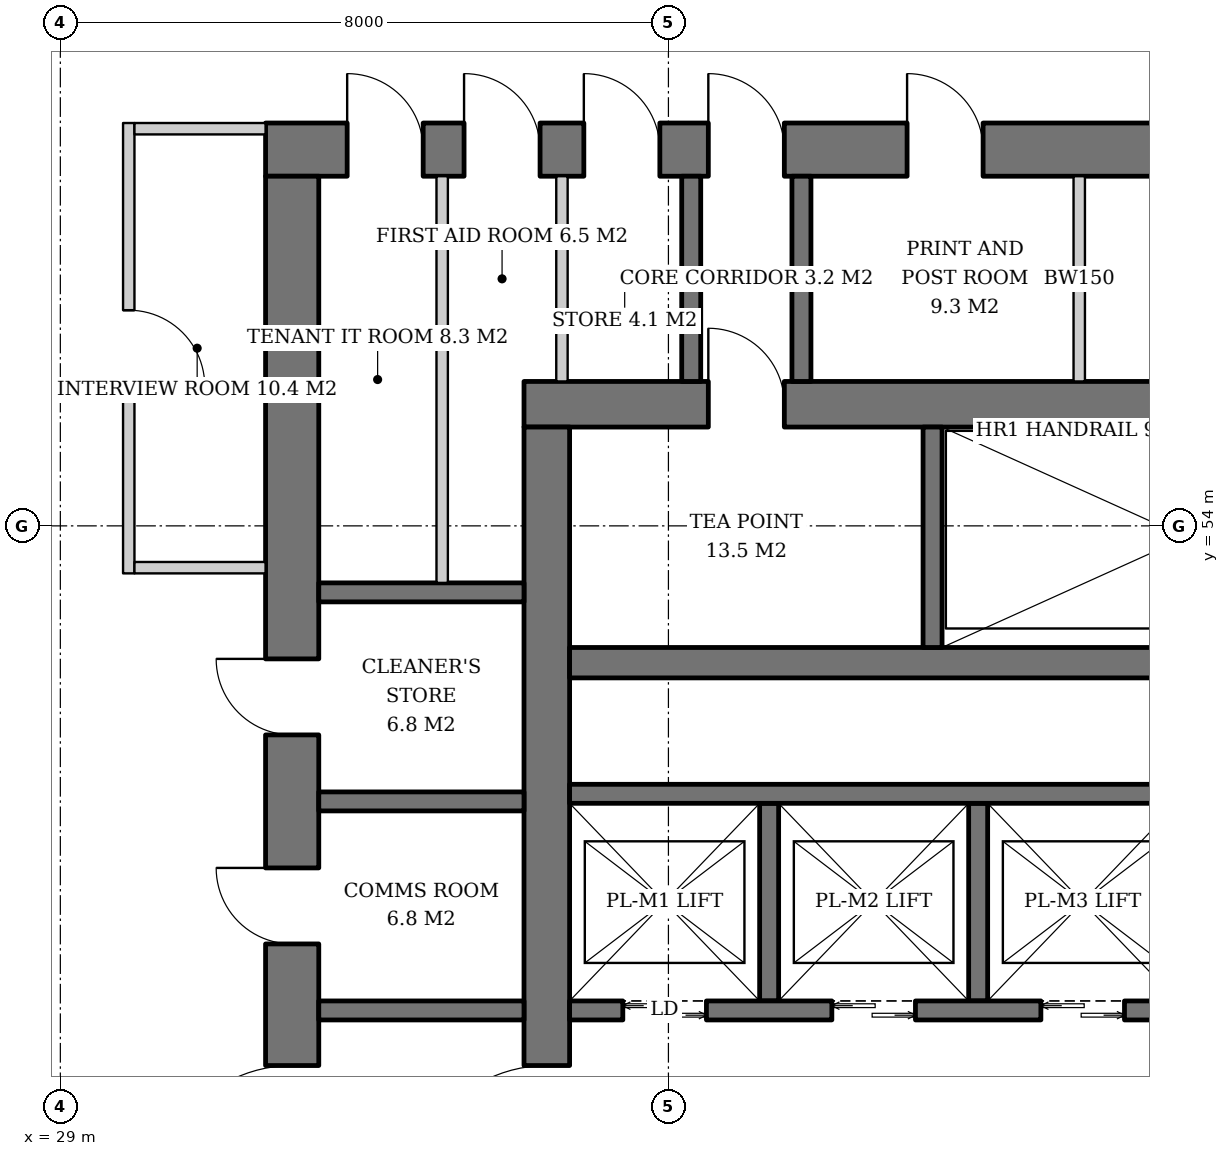
"""IFC4 building model, lengths in metres.
Left out: names, types, materials, properties, quantities, classifications, styles, units other than length and angle.
Written with IfcOpenShell. Run it as: python <this file> out.ifc"""

import sys

from ifc_helpers import new_model, si_unit, direction, frame, frame_2d, origin, place, context, subcontext, project, spatial, rectangle, extrude, element, fill, save


model = new_model("IFC4")
c1 = context("Model", 3, precision=1e-05, world=origin(), true_north=direction((0.0, 1.0)))
c2 = subcontext(c1, "Body", "Model", "MODEL_VIEW")
j1 = project(units=[si_unit("LENGTHUNIT", "METRE"), si_unit("PLANEANGLEUNIT", "RADIAN")], contexts=[c1])
p1 = place(None, origin())
s1 = spatial("IfcSite", under=j1, at=p1, CompositionType="ELEMENT")
p2 = place(p1, origin())
s2 = spatial("IfcBuilding", under=s1, at=p2, CompositionType="ELEMENT")
p3 = place(p2, frame((0.0, 0.0, 135.0)))
s3 = spatial("IfcBuildingStorey", under=s2, at=p3, CompositionType="ELEMENT", Elevation=135.0)
p4 = place(p3, frame((35.1, 55.6, 0.0), z_axis=(0.0, 0.0, 1.0), x_axis=(1.0, 0.0, 0.0)))
e1 = element("IfcWall", 1, at=p4, inside=s3, PredefinedType="SHEAR", context=c2, shape_type="SweptSolid", body=[
    extrude(rectangle(XDim=19.8, YDim=0.6, at=frame_2d((9.9, 0.0))), origin(), (0.0, 0.0, 1.0), 3.8),
])
p5 = place(p4, frame((14.54, 0.0, 0.0)))
e2 = element("IfcOpeningElement", 2, at=p5, cuts=e1, PredefinedType="OPENING", context=c2, shape_type="SweptSolid", body=[
    extrude(rectangle(XDim=1.0, YDim=2.1, at=frame_2d((0.5, 1.05))), frame((0.0, 0.31, 0.0), z_axis=(0.0, -1.0, 0.0), x_axis=(1.0, 0.0, 0.0)), (0.0, 0.0, 1.0), 0.62),
])
p6 = place(p4, frame((2.425, 0.0, 0.0)))
e3 = element("IfcOpeningElement", 3, at=p6, cuts=e1, PredefinedType="OPENING", context=c2, shape_type="SweptSolid", body=[
    extrude(rectangle(XDim=1.0, YDim=2.1, at=frame_2d((0.5, 1.05))), frame((0.0, 0.31, 0.0), z_axis=(0.0, -1.0, 0.0), x_axis=(1.0, 0.0, 0.0)), (0.0, 0.0, 1.0), 0.62),
])
p7 = place(p3, frame((35.4, 36.7, 0.0), z_axis=(0.0, 0.0, 1.0), x_axis=(0.0, 1.0, 0.0)))
e4 = element("IfcWall", 4, at=p7, inside=s3, PredefinedType="SHEAR", context=c2, shape_type="SweptSolid", body=[
    extrude(rectangle(XDim=18.6, YDim=0.6, at=frame_2d((9.3, 0.0))), origin(), (0.0, 0.0, 1.0), 3.8),
])
p8 = place(p7, frame((8.4, 0.0, 0.0)))
e5 = element("IfcOpeningElement", 5, at=p8, cuts=e4, PredefinedType="OPENING", context=c2, shape_type="SweptSolid", body=[
    extrude(rectangle(XDim=1.8, YDim=2.4, at=frame_2d((0.9, 1.2))), frame((0.0, 0.31, 0.0), z_axis=(0.0, -1.0, 0.0), x_axis=(1.0, 0.0, 0.0)), (0.0, 0.0, 1.0), 0.62),
])
p9 = place(p3, frame((31.7, 58.95, 0.0), z_axis=(0.0, 0.0, 1.0), x_axis=(1.0, 0.0, 0.0)))
e6 = element("IfcWall", 6, at=p9, inside=s3, PredefinedType="SHEAR", context=c2, shape_type="SweptSolid", body=[
    extrude(rectangle(XDim=26.6, YDim=0.7, at=frame_2d((13.3, 0.0))), origin(), (0.0, 0.0, 1.0), 3.8),
])
p10 = place(p9, frame((17.94, 0.0, 0.0)))
e7 = element("IfcOpeningElement", 7, at=p10, cuts=e6, PredefinedType="OPENING", context=c2, shape_type="SweptSolid", body=[
    extrude(rectangle(XDim=1.0, YDim=2.1, at=frame_2d((0.5, 1.05))), frame((0.0, 0.36, 0.0), z_axis=(0.0, -1.0, 0.0), x_axis=(1.0, 0.0, 0.0)), (0.0, 0.0, 1.0), 0.72),
])
p11 = place(p9, frame((5.825, 0.0, 0.0)))
e8 = element("IfcOpeningElement", 8, at=p11, cuts=e6, PredefinedType="OPENING", context=c2, shape_type="SweptSolid", body=[
    extrude(rectangle(XDim=1.0, YDim=2.1, at=frame_2d((0.5, 1.05))), frame((0.0, 0.36, 0.0), z_axis=(0.0, -1.0, 0.0), x_axis=(1.0, 0.0, 0.0)), (0.0, 0.0, 1.0), 0.72),
])
p12 = place(p9, frame((1.073, 0.0, 0.0)))
e9 = element("IfcOpeningElement", 9, at=p12, cuts=e6, PredefinedType="OPENING", context=c2, shape_type="SweptSolid", body=[
    extrude(rectangle(XDim=1.0, YDim=2.1, at=frame_2d((0.5, 1.05))), frame((0.0, 0.36, 0.0), z_axis=(0.0, -1.0, 0.0), x_axis=(1.0, 0.0, 0.0)), (0.0, 0.0, 1.0), 0.72),
])
p13 = place(p9, frame((2.611, 0.0, 0.0)))
e10 = element("IfcOpeningElement", 10, at=p13, cuts=e6, PredefinedType="OPENING", context=c2, shape_type="SweptSolid", body=[
    extrude(rectangle(XDim=1.0, YDim=2.1, at=frame_2d((0.5, 1.05))), frame((0.0, 0.36, 0.0), z_axis=(0.0, -1.0, 0.0), x_axis=(1.0, 0.0, 0.0)), (0.0, 0.0, 1.0), 0.72),
])
p14 = place(p9, frame((4.187, 0.0, 0.0)))
e11 = element("IfcOpeningElement", 11, at=p14, cuts=e6, PredefinedType="OPENING", context=c2, shape_type="SweptSolid", body=[
    extrude(rectangle(XDim=1.0, YDim=2.1, at=frame_2d((0.5, 1.05))), frame((0.0, 0.36, 0.0), z_axis=(0.0, -1.0, 0.0), x_axis=(1.0, 0.0, 0.0)), (0.0, 0.0, 1.0), 0.72),
])
p15 = place(p9, frame((8.44, 0.0, 0.0)))
e12 = element("IfcOpeningElement", 12, at=p15, cuts=e6, PredefinedType="OPENING", context=c2, shape_type="SweptSolid", body=[
    extrude(rectangle(XDim=1.0, YDim=2.1, at=frame_2d((0.5, 1.05))), frame((0.0, 0.36, 0.0), z_axis=(0.0, -1.0, 0.0), x_axis=(1.0, 0.0, 0.0)), (0.0, 0.0, 1.0), 0.72),
])
p16 = place(p9, frame((13.342, 0.0, 0.0)))
e13 = element("IfcOpeningElement", 13, at=p16, cuts=e6, PredefinedType="OPENING", context=c2, shape_type="SweptSolid", body=[
    extrude(rectangle(XDim=1.0, YDim=2.1, at=frame_2d((0.5, 1.05))), frame((0.0, 0.36, 0.0), z_axis=(0.0, -1.0, 0.0), x_axis=(1.0, 0.0, 0.0)), (0.0, 0.0, 1.0), 0.72),
])
p17 = place(p9, frame((22.4, 0.0, 0.0)))
e14 = element("IfcOpeningElement", 14, at=p17, cuts=e6, PredefinedType="OPENING", context=c2, shape_type="SweptSolid", body=[
    extrude(rectangle(XDim=1.0, YDim=2.1, at=frame_2d((0.5, 1.05))), frame((0.0, 0.36, 0.0), z_axis=(0.0, -1.0, 0.0), x_axis=(1.0, 0.0, 0.0)), (0.0, 0.0, 1.0), 0.72),
])
p18 = place(p3, frame((32.05, 33.4, 0.0), z_axis=(0.0, 0.0, 1.0), x_axis=(0.0, 1.0, 0.0)))
e15 = element("IfcWall", 15, at=p18, inside=s3, PredefinedType="SHEAR", context=c2, shape_type="SweptSolid", body=[
    extrude(rectangle(XDim=25.2, YDim=0.7, at=frame_2d((12.6, 0.0))), origin(), (0.0, 0.0, 1.0), 3.8),
])
p19 = place(p18, frame((11.7, 0.0, 0.0)))
e16 = element("IfcOpeningElement", 16, at=p19, cuts=e15, PredefinedType="OPENING", context=c2, shape_type="SweptSolid", body=[
    extrude(rectangle(XDim=1.8, YDim=2.4, at=frame_2d((0.9, 1.2))), frame((0.0, 0.36, 0.0), z_axis=(0.0, -1.0, 0.0), x_axis=(1.0, 0.0, 0.0)), (0.0, 0.0, 1.0), 0.72),
])
p20 = place(p18, frame((3.6, 0.0, 0.0)))
e17 = element("IfcOpeningElement", 17, at=p20, cuts=e15, PredefinedType="OPENING", context=c2, shape_type="SweptSolid", body=[
    extrude(rectangle(XDim=1.0, YDim=2.1, at=frame_2d((0.5, 1.05))), frame((0.0, 0.36, 0.0), z_axis=(0.0, -1.0, 0.0), x_axis=(1.0, 0.0, 0.0)), (0.0, 0.0, 1.0), 0.72),
])
p21 = place(p18, frame((6.35, 0.0, 0.0)))
e18 = element("IfcOpeningElement", 18, at=p21, cuts=e15, PredefinedType="OPENING", context=c2, shape_type="SweptSolid", body=[
    extrude(rectangle(XDim=1.0, YDim=2.1, at=frame_2d((0.5, 1.05))), frame((0.0, 0.36, 0.0), z_axis=(0.0, -1.0, 0.0), x_axis=(1.0, 0.0, 0.0)), (0.0, 0.0, 1.0), 0.72),
])
p22 = place(p18, frame((9.1, 0.0, 0.0)))
e19 = element("IfcOpeningElement", 19, at=p22, cuts=e15, PredefinedType="OPENING", context=c2, shape_type="SweptSolid", body=[
    extrude(rectangle(XDim=1.0, YDim=2.1, at=frame_2d((0.5, 1.05))), frame((0.0, 0.36, 0.0), z_axis=(0.0, -1.0, 0.0), x_axis=(1.0, 0.0, 0.0)), (0.0, 0.0, 1.0), 0.72),
])
p23 = place(p18, frame((15.1, 0.0, 0.0)))
e20 = element("IfcOpeningElement", 20, at=p23, cuts=e15, PredefinedType="OPENING", context=c2, shape_type="SweptSolid", body=[
    extrude(rectangle(XDim=1.0, YDim=2.1, at=frame_2d((0.5, 1.05))), frame((0.0, 0.36, 0.0), z_axis=(0.0, -1.0, 0.0), x_axis=(1.0, 0.0, 0.0)), (0.0, 0.0, 1.0), 0.72),
])
p24 = place(p18, frame((17.85, 0.0, 0.0)))
e21 = element("IfcOpeningElement", 21, at=p24, cuts=e15, PredefinedType="OPENING", context=c2, shape_type="SweptSolid", body=[
    extrude(rectangle(XDim=1.0, YDim=2.1, at=frame_2d((0.5, 1.05))), frame((0.0, 0.36, 0.0), z_axis=(0.0, -1.0, 0.0), x_axis=(1.0, 0.0, 0.0)), (0.0, 0.0, 1.0), 0.72),
])
p25 = place(p3, frame((35.7, 52.2, 0.0), z_axis=(0.0, 0.0, 1.0), x_axis=(1.0, 0.0, 0.0)))
e22 = element("IfcWall", 22, at=p25, inside=s3, PredefinedType="SHEAR", context=c2, shape_type="SweptSolid", body=[
    extrude(rectangle(XDim=18.6, YDim=0.4, at=frame_2d((9.3, 0.0))), origin(), (0.0, 0.0, 1.0), 3.8),
])
p26 = place(p3, frame((40.475, 52.4, 0.0), z_axis=(0.0, 0.0, 1.0), x_axis=(0.0, 1.0, 0.0)))
e23 = element("IfcWall", 23, at=p26, inside=s3, PredefinedType="SHEAR", context=c2, shape_type="SweptSolid", body=[
    extrude(rectangle(XDim=2.9, YDim=0.25, at=frame_2d((1.45, 0.0))), origin(), (0.0, 0.0, 1.0), 3.8),
])
for number, where, z_axis, x_axis in (
    (24, (38.325, 47.75, 0.0), (0.0, 0.0, 1.0), (0.0, 1.0, 0.0)),
    (25, (41.075, 47.75, 0.0), (0.0, 0.0, 1.0), (0.0, 1.0, 0.0)),
):
    element("IfcWall", number, at=place(p3, frame(where, z_axis=z_axis, x_axis=x_axis)), inside=s3, PredefinedType="SHEAR", context=c2, shape_type="SweptSolid", body=[
        extrude(rectangle(XDim=2.6, YDim=0.25, at=frame_2d((1.3, 0.0))), origin(), (0.0, 0.0, 1.0), 3.8),
    ])
p27 = place(p3, frame((35.7, 50.475, 0.0), z_axis=(0.0, 0.0, 1.0), x_axis=(1.0, 0.0, 0.0)))
e26 = element("IfcWall", 26, at=p27, inside=s3, PredefinedType="SHEAR", context=c2, shape_type="SweptSolid", body=[
    extrude(rectangle(XDim=11.0, YDim=0.25, at=frame_2d((5.5, 0.0))), origin(), (0.0, 0.0, 1.0), 3.8),
])
p28 = place(p3, frame((35.7, 47.625, 0.0), z_axis=(0.0, 0.0, 1.0), x_axis=(1.0, 0.0, 0.0)))
e27 = element("IfcWall", 27, at=p28, inside=s3, PredefinedType="SHEAR", context=c2, shape_type="SweptSolid", body=[
    extrude(rectangle(XDim=12.83, YDim=0.25, at=frame_2d((6.415, 0.0))), origin(), (0.0, 0.0, 1.0), 3.8),
])
p29 = place(p28, frame((0.7, 0.0, 0.0)))
e28 = element("IfcOpeningElement", 28, at=p29, cuts=e27, PredefinedType="OPENING", context=c2, shape_type="SweptSolid", body=[
    extrude(rectangle(XDim=1.1, YDim=2.2, at=frame_2d((0.55, 1.1))), frame((0.0, 0.135, 0.0), z_axis=(0.0, -1.0, 0.0), x_axis=(1.0, 0.0, 0.0)), (0.0, 0.0, 1.0), 0.27),
])
p30 = place(p28, frame((3.45, 0.0, 0.0)))
e29 = element("IfcOpeningElement", 29, at=p30, cuts=e27, PredefinedType="OPENING", context=c2, shape_type="SweptSolid", body=[
    extrude(rectangle(XDim=1.1, YDim=2.2, at=frame_2d((0.55, 1.1))), frame((0.0, 0.135, 0.0), z_axis=(0.0, -1.0, 0.0), x_axis=(1.0, 0.0, 0.0)), (0.0, 0.0, 1.0), 0.27),
])
p31 = place(p28, frame((6.2, 0.0, 0.0)))
e30 = element("IfcOpeningElement", 30, at=p31, cuts=e27, PredefinedType="OPENING", context=c2, shape_type="SweptSolid", body=[
    extrude(rectangle(XDim=1.1, YDim=2.2, at=frame_2d((0.55, 1.1))), frame((0.0, 0.135, 0.0), z_axis=(0.0, -1.0, 0.0), x_axis=(1.0, 0.0, 0.0)), (0.0, 0.0, 1.0), 0.27),
])
p32 = place(p28, frame((8.95, 0.0, 0.0)))
e31 = element("IfcOpeningElement", 31, at=p32, cuts=e27, PredefinedType="OPENING", context=c2, shape_type="SweptSolid", body=[
    extrude(rectangle(XDim=1.1, YDim=2.2, at=frame_2d((0.55, 1.1))), frame((0.0, 0.135, 0.0), z_axis=(0.0, -1.0, 0.0), x_axis=(1.0, 0.0, 0.0)), (0.0, 0.0, 1.0), 0.27),
])
p33 = place(p28, frame((11.515, 0.0, 0.0)))
e32 = element("IfcOpeningElement", 32, at=p33, cuts=e27, PredefinedType="OPENING", context=c2, shape_type="SweptSolid", body=[
    extrude(rectangle(XDim=0.8, YDim=2.0, at=frame_2d((0.4, 1.0))), frame((0.0, 0.135, 0.0), z_axis=(0.0, -1.0, 0.0), x_axis=(1.0, 0.0, 0.0)), (0.0, 0.0, 1.0), 0.27),
])
for number, where, z_axis, x_axis in (
    (33, (32.4, 47.625, 0.0), (0.0, 0.0, 1.0), (1.0, 0.0, 0.0)),
    (34, (32.4, 50.375, 0.0), (0.0, 0.0, 1.0), (1.0, 0.0, 0.0)),
    (35, (32.4, 53.125, 0.0), (0.0, 0.0, 1.0), (1.0, 0.0, 0.0)),
):
    element("IfcWall", number, at=place(p3, frame(where, z_axis=z_axis, x_axis=x_axis)), inside=s3, PredefinedType="SHEAR", context=c2, shape_type="SweptSolid", body=[
        extrude(rectangle(XDim=2.7, YDim=0.25, at=frame_2d((1.35, 0.0))), origin(), (0.0, 0.0, 1.0), 3.8),
    ])
for number, where, z_axis, x_axis in (
    (36, (37.3, 55.9, 0.0), (0.0, 0.0, 1.0), (0.0, 1.0, 0.0)),
    (37, (38.75, 55.9, 0.0), (0.0, 0.0, 1.0), (0.0, 1.0, 0.0)),
):
    element("IfcWall", number, at=place(p3, frame(where, z_axis=z_axis, x_axis=x_axis)), inside=s3, PredefinedType="SOLIDWALL", context=c2, shape_type="SweptSolid", body=[
        extrude(rectangle(XDim=2.7, YDim=0.25, at=frame_2d((1.35, 0.0))), origin(), (0.0, 0.0, 1.0), 3.62),
    ])
p34 = place(p3, frame((34.023, 53.25, 0.0), z_axis=(0.0, 0.0, 1.0), x_axis=(0.0, 1.0, 0.0)))
e38 = element("IfcWall", 38, at=p34, inside=s3, PredefinedType="SOLIDWALL", context=c2, shape_type="SweptSolid", body=[
    extrude(rectangle(XDim=5.35, YDim=0.15, at=frame_2d((2.675, 0.0))), origin(), (0.0, 0.0, 1.0), 3.62),
])
for number, where, z_axis, x_axis in (
    (39, (35.599, 55.9, 0.0), (0.0, 0.0, 1.0), (0.0, 1.0, 0.0)),
    (40, (42.405, 55.9, 0.0), (0.0, 0.0, 1.0), (0.0, 1.0, 0.0)),
):
    element("IfcWall", number, at=place(p3, frame(where, z_axis=z_axis, x_axis=x_axis)), inside=s3, PredefinedType="SOLIDWALL", context=c2, shape_type="SweptSolid", body=[
        extrude(rectangle(XDim=2.7, YDim=0.15, at=frame_2d((1.35, 0.0))), origin(), (0.0, 0.0, 1.0), 3.62),
    ])
p35 = place(p3, frame((29.9, 59.3, 0.0), z_axis=(0.0, 0.0, 1.0), x_axis=(0.0, -1.0, 0.0)))
e41 = element("IfcWall", 41, at=p35, inside=s3, PredefinedType="PARTITIONING", context=c2, shape_type="SweptSolid", body=[
    extrude(rectangle(XDim=5.925, YDim=0.15, at=frame_2d((2.962, 0.0))), origin(), (0.0, 0.0, 1.0), 2.72),
])
p36 = place(p35, frame((2.462, 0.0, 0.0)))
e42 = element("IfcOpeningElement", 42, at=p36, cuts=e41, PredefinedType="OPENING", context=c2, shape_type="SweptSolid", body=[
    extrude(rectangle(XDim=1.0, YDim=2.1, at=frame_2d((0.5, 1.05))), frame((0.0, 0.085, 0.0), z_axis=(0.0, -1.0, 0.0), x_axis=(1.0, 0.0, 0.0)), (0.0, 0.0, 1.0), 0.17),
])
for number, where, z_axis, x_axis in (
    (43, (31.7, 59.225, 0.0), (0.0, 0.0, 1.0), (-1.0, 0.0, 0.0)),
    (44, (31.7, 53.45, 0.0), (0.0, 0.0, 1.0), (-1.0, 0.0, 0.0)),
):
    element("IfcWall", number, at=place(p3, frame(where, z_axis=z_axis, x_axis=x_axis)), inside=s3, PredefinedType="PARTITIONING", context=c2, shape_type="SweptSolid", body=[
        extrude(rectangle(XDim=1.725, YDim=0.15, at=frame_2d((0.862, 0.0))), origin(), (0.0, 0.0, 1.0), 3.62),
    ])
p37 = place(p29, origin())
e45 = element("IfcDoor", 45, at=p37, inside=s3, OperationType="DOUBLE_DOOR_SLIDING", PredefinedType="DOOR", context=c2, shape_type="SweptSolid", body=[
    extrude(rectangle(XDim=1.1, YDim=2.2, at=frame_2d((0.55, 1.1))), frame((0.0, 0.025, 0.0), z_axis=(0.0, -1.0, 0.0), x_axis=(1.0, 0.0, 0.0)), (0.0, 0.0, 1.0), 0.05),
])
fill(e28, e45)
p38 = place(p30, origin())
e46 = element("IfcDoor", 46, at=p38, inside=s3, OperationType="DOUBLE_DOOR_SLIDING", PredefinedType="DOOR", context=c2, shape_type="SweptSolid", body=[
    extrude(rectangle(XDim=1.1, YDim=2.2, at=frame_2d((0.55, 1.1))), frame((0.0, 0.025, 0.0), z_axis=(0.0, -1.0, 0.0), x_axis=(1.0, 0.0, 0.0)), (0.0, 0.0, 1.0), 0.05),
])
fill(e29, e46)
p39 = place(p31, origin())
e47 = element("IfcDoor", 47, at=p39, inside=s3, OperationType="DOUBLE_DOOR_SLIDING", PredefinedType="DOOR", context=c2, shape_type="SweptSolid", body=[
    extrude(rectangle(XDim=1.1, YDim=2.2, at=frame_2d((0.55, 1.1))), frame((0.0, 0.025, 0.0), z_axis=(0.0, -1.0, 0.0), x_axis=(1.0, 0.0, 0.0)), (0.0, 0.0, 1.0), 0.05),
])
fill(e30, e47)
p40 = place(p8, origin())
e48 = element("IfcDoor", 48, at=p40, inside=s3, OperationType="DOUBLE_DOOR_SINGLE_SWING", PredefinedType="DOOR", context=c2, shape_type="SweptSolid", body=[
    extrude(rectangle(XDim=1.8, YDim=2.4, at=frame_2d((0.9, 1.2))), frame((0.0, 0.025, 0.0), z_axis=(0.0, -1.0, 0.0), x_axis=(1.0, 0.0, 0.0)), (0.0, 0.0, 1.0), 0.05),
])
fill(e5, e48)
p41 = place(p19, origin())
e49 = element("IfcDoor", 49, at=p41, inside=s3, OperationType="DOUBLE_DOOR_SINGLE_SWING", PredefinedType="DOOR", context=c2, shape_type="SweptSolid", body=[
    extrude(rectangle(XDim=1.8, YDim=2.4, at=frame_2d((0.9, 1.2))), frame((0.0, 0.025, 0.0), z_axis=(0.0, -1.0, 0.0), x_axis=(1.0, 0.0, 0.0)), (0.0, 0.0, 1.0), 0.05),
])
fill(e16, e49)
p42 = place(p11, origin())
e50 = element("IfcDoor", 50, at=p42, inside=s3, OperationType="SINGLE_SWING_LEFT", PredefinedType="DOOR", context=c2, shape_type="SweptSolid", body=[
    extrude(rectangle(XDim=1.0, YDim=2.1, at=frame_2d((0.5, 1.05))), frame((0.0, 0.025, 0.0), z_axis=(0.0, -1.0, 0.0), x_axis=(1.0, 0.0, 0.0)), (0.0, 0.0, 1.0), 0.05),
])
fill(e8, e50)
p43 = place(p6, origin())
e51 = element("IfcDoor", 51, at=p43, inside=s3, OperationType="SINGLE_SWING_LEFT", PredefinedType="DOOR", context=c2, shape_type="SweptSolid", body=[
    extrude(rectangle(XDim=1.0, YDim=2.1, at=frame_2d((0.5, 1.05))), frame((0.0, -0.24, 0.0), z_axis=(0.0, -1.0, 0.0), x_axis=(1.0, 0.0, 0.0)), (0.0, 0.0, 1.0), 0.05),
])
fill(e3, e51)
p44 = place(p23, origin())
e52 = element("IfcDoor", 52, at=p44, inside=s3, OperationType="SINGLE_SWING_RIGHT", PredefinedType="DOOR", context=c2, shape_type="SweptSolid", body=[
    extrude(rectangle(XDim=1.0, YDim=2.1, at=frame_2d((0.5, 1.05))), frame((0.0, -0.29, 0.0), z_axis=(0.0, -1.0, 0.0), x_axis=(1.0, 0.0, 0.0)), (0.0, 0.0, 1.0), 0.05),
])
fill(e20, e52)
p45 = place(p24, origin())
e53 = element("IfcDoor", 53, at=p45, inside=s3, OperationType="SINGLE_SWING_RIGHT", PredefinedType="DOOR", context=c2, shape_type="SweptSolid", body=[
    extrude(rectangle(XDim=1.0, YDim=2.1, at=frame_2d((0.5, 1.05))), frame((0.0, -0.29, 0.0), z_axis=(0.0, -1.0, 0.0), x_axis=(1.0, 0.0, 0.0)), (0.0, 0.0, 1.0), 0.05),
])
fill(e21, e53)
p46 = place(p12, origin())
e54 = element("IfcDoor", 54, at=p46, inside=s3, OperationType="SINGLE_SWING_LEFT", PredefinedType="DOOR", context=c2, shape_type="SweptSolid", body=[
    extrude(rectangle(XDim=1.0, YDim=2.1, at=frame_2d((0.5, 1.05))), frame((0.0, -0.29, 0.0), z_axis=(0.0, -1.0, 0.0), x_axis=(1.0, 0.0, 0.0)), (0.0, 0.0, 1.0), 0.05),
])
fill(e9, e54)
p47 = place(p13, origin())
e55 = element("IfcDoor", 55, at=p47, inside=s3, OperationType="SINGLE_SWING_LEFT", PredefinedType="DOOR", context=c2, shape_type="SweptSolid", body=[
    extrude(rectangle(XDim=1.0, YDim=2.1, at=frame_2d((0.5, 1.05))), frame((0.0, -0.29, 0.0), z_axis=(0.0, -1.0, 0.0), x_axis=(1.0, 0.0, 0.0)), (0.0, 0.0, 1.0), 0.05),
])
fill(e10, e55)
p48 = place(p14, origin())
e56 = element("IfcDoor", 56, at=p48, inside=s3, OperationType="SINGLE_SWING_LEFT", PredefinedType="DOOR", context=c2, shape_type="SweptSolid", body=[
    extrude(rectangle(XDim=1.0, YDim=2.1, at=frame_2d((0.5, 1.05))), frame((0.0, -0.29, 0.0), z_axis=(0.0, -1.0, 0.0), x_axis=(1.0, 0.0, 0.0)), (0.0, 0.0, 1.0), 0.05),
])
fill(e11, e56)
p49 = place(p15, origin())
e57 = element("IfcDoor", 57, at=p49, inside=s3, OperationType="SINGLE_SWING_LEFT", PredefinedType="DOOR", context=c2, shape_type="SweptSolid", body=[
    extrude(rectangle(XDim=1.0, YDim=2.1, at=frame_2d((0.5, 1.05))), frame((0.0, -0.29, 0.0), z_axis=(0.0, -1.0, 0.0), x_axis=(1.0, 0.0, 0.0)), (0.0, 0.0, 1.0), 0.05),
])
fill(e12, e57)
p50 = place(p36, origin())
e58 = element("IfcDoor", 58, at=p50, inside=s3, OperationType="SINGLE_SWING_RIGHT", PredefinedType="DOOR", context=c2, shape_type="SweptSolid", body=[
    extrude(rectangle(XDim=1.0, YDim=2.1, at=frame_2d((0.5, 1.05))), frame((0.0, 0.025, 0.0), z_axis=(0.0, -1.0, 0.0), x_axis=(1.0, 0.0, 0.0)), (0.0, 0.0, 1.0), 0.05),
])
fill(e42, e58)
save(model, sys.argv[1])
